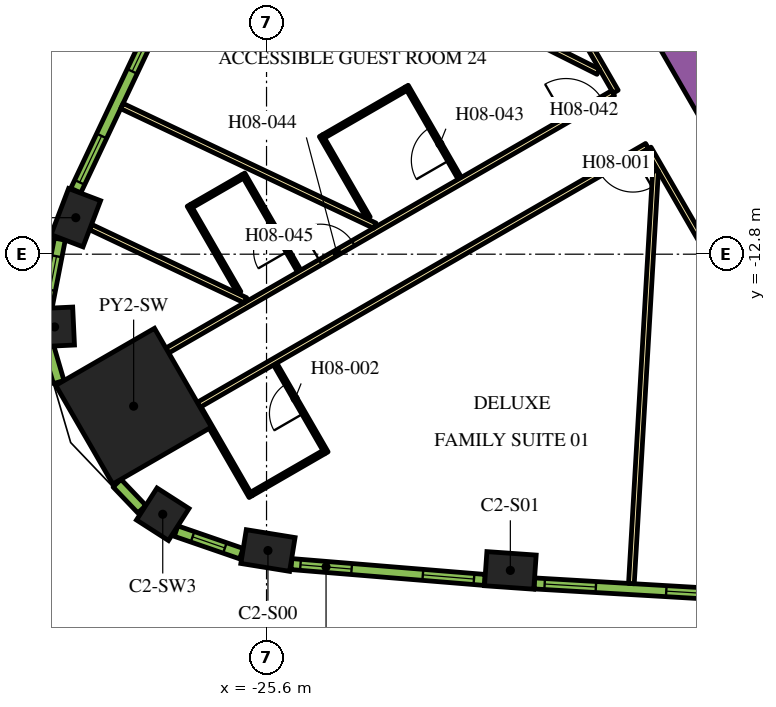
"""IFC4 building model, lengths in metres.
Left out: names, types, materials, properties, quantities, classifications, styles, units other than length and angle.
Written with IfcOpenShell. Run it as: python <this file> out.ifc"""

import sys

from ifc_helpers import new_model, si_unit, direction, frame, frame_2d, origin, origin_2d, place, context, subcontext, project, spatial, rectangle, extrude, element, fill, save


model = new_model("IFC4")
c1 = context("Model", 3, precision=1e-05, world=origin(), true_north=direction((0.0, 1.0)))
c2 = subcontext(c1, "Body", "Model", "MODEL_VIEW")
j1 = project(units=[si_unit("LENGTHUNIT", "METRE"), si_unit("PLANEANGLEUNIT", "RADIAN")], contexts=[c1])
p1 = place(None, origin())
s1 = spatial("IfcSite", under=j1, at=p1, CompositionType="ELEMENT")
p2 = place(p1, origin())
s2 = spatial("IfcBuilding", under=s1, at=p2, CompositionType="ELEMENT")
p3 = place(p2, frame((0.0, 0.0, 114.9)))
s3 = spatial("IfcBuildingStorey", under=s2, at=p3, CompositionType="ELEMENT", Elevation=114.9)
p4 = place(p3, frame((-29.097, -16.799, 0.0), z_axis=(0.0, 0.0, 1.0), x_axis=(-0.866025403784, -0.5, 0.0)))
e1 = element("IfcColumn", 1, at=p4, inside=s3, PredefinedType="COLUMN", context=c2, shape_type="SweptSolid", body=[
    extrude(rectangle(XDim=3.0, YDim=3.0, at=origin_2d()), origin(), (0.0, 0.0, 1.0), 3.9),
])
for number, where, z_axis, x_axis in (
    (2, (-25.563, -20.597, 0.0), (0.0, 0.0, 1.0), (0.987, -0.159, 0.0)),
    (3, (-19.184, -21.12, 0.0), (0.0, 0.0, 1.0), (0.998, -0.07, 0.0)),
    (4, (-30.619, -11.839, 0.0), (0.0, 0.0, 1.0), (-0.355, -0.935, 0.0)),
):
    element("IfcColumn", number, at=place(p3, frame(where, z_axis=z_axis, x_axis=x_axis)), inside=s3, PredefinedType="COLUMN", context=c2, shape_type="SweptSolid", body=[
        extrude(rectangle(XDim=1.3, YDim=0.9, at=origin_2d()), origin(), (0.0, 0.0, 1.0), 3.9),
    ])
for number, where, z_axis, x_axis in (
    (5, (-31.177, -14.714, 0.0), (0.0, 0.0, 1.0), (0.047, -0.999, 0.0)),
    (6, (-28.331, -19.643, 0.0), (0.0, 0.0, 1.0), (0.842, -0.54, 0.0)),
):
    element("IfcColumn", number, at=place(p3, frame(where, z_axis=z_axis, x_axis=x_axis)), inside=s3, PredefinedType="COLUMN", context=c2, shape_type="SweptSolid", body=[
        extrude(rectangle(XDim=1.0, YDim=1.0, at=origin_2d()), origin(), (0.0, 0.0, 1.0), 3.9),
    ])
p5 = place(p3, frame((-12.134, -11.883, 0.0), z_axis=(0.0, 0.0, 1.0), x_axis=(-0.500005339912, 0.866022320763, 0.0)))
e7 = element("IfcWall", 7, at=p5, inside=s3, PredefinedType="SOLIDWALL", context=c2, shape_type="SweptSolid", body=[
    extrude(rectangle(XDim=9.488, YDim=0.9, at=frame_2d((4.744, 0.0))), origin(), (0.0, 0.0, 1.0), 3.9),
])
p6 = place(p3, frame((-12.885, -9.431, 0.0), z_axis=(0.0, 0.0, 1.0), x_axis=(-0.500020560727, 0.866013532718, 0.0)))
e8 = element("IfcWall", 8, at=p6, inside=s3, PredefinedType="SOLIDWALL", context=c2, shape_type="SweptSolid", body=[
    extrude(rectangle(XDim=3.45, YDim=0.25, at=frame_2d((1.725, 0.0))), origin(), (0.0, 0.0, 1.0), 3.9),
])
p7 = place(p3, frame((-16.412, -8.523, 0.0), z_axis=(0.0, 0.0, 1.0), x_axis=(-0.500001929737, 0.866024289647, 0.0)))
e9 = element("IfcWall", 9, at=p7, inside=s3, PredefinedType="PARTITIONING", context=c2, shape_type="SweptSolid", body=[
    extrude(rectangle(XDim=5.268, YDim=0.15, at=frame_2d((2.634, 0.0))), origin(), (0.0, 0.0, 1.0), 2.75),
])
p8 = place(p3, frame((-28.211, -15.335, 0.0), z_axis=(0.0, 0.0, 1.0), x_axis=(0.866025884867, 0.49999916674, 0.0)))
e10 = element("IfcWall", 10, at=p8, inside=s3, PredefinedType="PARTITIONING", context=c2, shape_type="SweptSolid", body=[
    extrude(rectangle(XDim=13.543, YDim=0.15, at=frame_2d((6.772, 0.0))), origin(), (0.0, 0.0, 1.0), 2.75),
])
p9 = place(p8, frame((12.114, 0.0, 0.0)))
e11 = element("IfcOpeningElement", 11, at=p9, cuts=e10, PredefinedType="OPENING", context=c2, shape_type="SweptSolid", body=[
    extrude(rectangle(XDim=1.1, YDim=2.1, at=frame_2d((0.55, 1.05))), frame((0.0, 0.085, 0.0), z_axis=(0.0, -1.0, 0.0), x_axis=(1.0, 0.0, 0.0)), (0.0, 0.0, 1.0), 0.17),
])
p10 = place(p8, frame((4.65, 0.0, 0.0)))
e12 = element("IfcOpeningElement", 12, at=p10, cuts=e10, PredefinedType="OPENING", context=c2, shape_type="SweptSolid", body=[
    extrude(rectangle(XDim=1.0, YDim=2.1, at=frame_2d((0.5, 1.05))), frame((0.0, 0.085, 0.0), z_axis=(0.0, -1.0, 0.0), x_axis=(1.0, 0.0, 0.0)), (0.0, 0.0, 1.0), 0.17),
])
p11 = place(p3, frame((-15.587, -9.952, 0.0), z_axis=(0.0, 0.0, 1.0), x_axis=(-0.866017869832, -0.500013048961, 0.0)))
e13 = element("IfcWall", 13, at=p11, inside=s3, PredefinedType="PARTITIONING", context=c2, shape_type="SweptSolid", body=[
    extrude(rectangle(XDim=13.624, YDim=0.15, at=frame_2d((6.812, 0.0))), origin(), (0.0, 0.0, 1.0), 2.75),
])
p12 = place(p11, frame((0.427, 0.0, 0.0)))
e14 = element("IfcOpeningElement", 14, at=p12, cuts=e13, PredefinedType="OPENING", context=c2, shape_type="SweptSolid", body=[
    extrude(rectangle(XDim=1.0, YDim=2.1, at=frame_2d((0.5, 1.05))), frame((0.0, 0.085, 0.0), z_axis=(0.0, -1.0, 0.0), x_axis=(1.0, 0.0, 0.0)), (0.0, 0.0, 1.0), 0.17),
])
p13 = place(p3, frame((-12.918, -14.575, 0.0), z_axis=(0.0, 0.0, 1.0), x_axis=(-0.500009150678, 0.866020120573, 0.0)))
e15 = element("IfcWall", 15, at=p13, inside=s3, PredefinedType="PARTITIONING", context=c2, shape_type="SweptSolid", body=[
    extrude(rectangle(XDim=5.258, YDim=0.15, at=frame_2d((2.629, 0.0))), origin(), (0.0, 0.0, 1.0), 2.75),
])
p14 = place(p3, frame((-30.231, -12.085, 0.0), z_axis=(0.0, 0.0, 1.0), x_axis=(0.904001132572, -0.427530060122, 0.0)))
e16 = element("IfcWall", 16, at=p14, inside=s3, PredefinedType="PARTITIONING", context=c2, shape_type="SweptSolid", body=[
    extrude(rectangle(XDim=4.51, YDim=0.15, at=frame_2d((2.255, 0.0))), origin(), (0.0, 0.0, 1.0), 2.75),
])
p15 = place(p3, frame((-29.406, -8.901, 0.0), z_axis=(0.0, 0.0, 1.0), x_axis=(0.904002363742, -0.427527456836, 0.0)))
e17 = element("IfcWall", 17, at=p15, inside=s3, PredefinedType="PARTITIONING", context=c2, shape_type="SweptSolid", body=[
    extrude(rectangle(XDim=7.362, YDim=0.15, at=frame_2d((3.681, 0.0))), origin(), (0.0, 0.0, 1.0), 2.75),
])
p16 = place(p3, frame((-26.591, -3.122, 0.0), z_axis=(0.0, 0.0, 1.0), x_axis=(0.893766213273, -0.448533115847, 0.0)))
e18 = element("IfcWall", 18, at=p16, inside=s3, PredefinedType="PARTITIONING", context=c2, shape_type="SweptSolid", body=[
    extrude(rectangle(XDim=10.875, YDim=0.15, at=frame_2d((5.438, 0.0))), origin(), (0.0, 0.0, 1.0), 2.75),
])
p17 = place(p3, frame((-15.999, -21.467, 0.0), z_axis=(0.0, 0.0, 1.0), x_axis=(0.058411453297, 0.998292593443, 0.0)))
e19 = element("IfcWall", 19, at=p17, inside=s3, PredefinedType="PARTITIONING", context=c2, shape_type="SweptSolid", body=[
    extrude(rectangle(XDim=10.875, YDim=0.15, at=frame_2d((5.438, 0.0))), origin(), (0.0, 0.0, 1.0), 2.75),
])
p18 = place(p3, frame((-24.024, -18.027, 0.0), z_axis=(0.0, 0.0, 1.0), x_axis=(-0.4999416173, 0.866059108428, 0.0)))
e20 = element("IfcWall", 20, at=p18, inside=s3, PredefinedType="PARTITIONING", context=c2, shape_type="SweptSolid", body=[
    extrude(rectangle(XDim=2.7, YDim=0.1, at=frame_2d((1.35, 0.0))), origin(), (0.0, 0.0, 1.0), 2.75),
])
p19 = place(p18, frame((1.2, 0.0, 0.0)))
e21 = element("IfcOpeningElement", 21, at=p19, cuts=e20, PredefinedType="OPENING", context=c2, shape_type="SweptSolid", body=[
    extrude(rectangle(XDim=0.9, YDim=2.1, at=frame_2d((0.45, 1.05))), frame((0.0, 0.06, 0.0), z_axis=(0.0, -1.0, 0.0), x_axis=(1.0, 0.0, 0.0)), (0.0, 0.0, 1.0), 0.12),
])
p20 = place(p3, frame((-24.092, -18.009, 0.0), z_axis=(0.0, 0.0, 1.0), x_axis=(-0.866083962871, -0.499898558967, 0.0)))
e22 = element("IfcWall", 22, at=p20, inside=s3, PredefinedType="PARTITIONING", context=c2, shape_type="SweptSolid", body=[
    extrude(rectangle(XDim=2.2, YDim=0.1, at=frame_2d((1.1, 0.0))), origin(), (0.0, 0.0, 1.0), 2.75),
])
p21 = place(p3, frame((-27.365, -16.839, 0.0), z_axis=(0.0, 0.0, 1.0), x_axis=(0.50000943426, -0.866019956843, 0.0)))
e23 = element("IfcWall", 23, at=p21, inside=s3, PredefinedType="PARTITIONING", context=c2, shape_type="SweptSolid", body=[
    extrude(rectangle(XDim=2.7, YDim=0.1, at=frame_2d((1.35, 0.0))), origin(), (0.0, 0.0, 1.0), 2.75),
])
p22 = place(p3, frame((-20.515, -10.805, 0.0), z_axis=(0.0, 0.0, 1.0), x_axis=(-0.49994636267, 0.866056369097, 0.0)))
e24 = element("IfcWall", 24, at=p22, inside=s3, PredefinedType="PARTITIONING", context=c2, shape_type="SweptSolid", body=[
    extrude(rectangle(XDim=2.8, YDim=0.1, at=frame_2d((1.4, 0.0))), origin(), (0.0, 0.0, 1.0), 2.75),
])
p23 = place(p22, frame((0.55, 0.0, 0.0)))
e25 = element("IfcOpeningElement", 25, at=p23, cuts=e24, PredefinedType="OPENING", context=c2, shape_type="SweptSolid", body=[
    extrude(rectangle(XDim=1.0, YDim=2.1, at=frame_2d((0.5, 1.05))), frame((0.0, 0.06, 0.0), z_axis=(0.0, -1.0, 0.0), x_axis=(1.0, 0.0, 0.0)), (0.0, 0.0, 1.0), 0.12),
])
for number, where, z_axis, x_axis in (
    (26, (-21.933, -8.448, 0.0), (0.0, 0.0, 1.0), (-0.866, -0.5, 0.0)),
    (27, (-22.916, -11.845, 0.0), (0.0, 0.0, 1.0), (-0.5, 0.866, 0.0)),
):
    element("IfcWall", number, at=place(p3, frame(where, z_axis=z_axis, x_axis=x_axis)), inside=s3, PredefinedType="PARTITIONING", context=c2, shape_type="SweptSolid", body=[
        extrude(rectangle(XDim=2.5, YDim=0.1, at=frame_2d((1.25, 0.0))), origin(), (0.0, 0.0, 1.0), 2.75),
    ])
p24 = place(p3, frame((-24.74, -13.244, 0.0), z_axis=(0.0, 0.0, 1.0), x_axis=(-0.500037662692, 0.866003658127, 0.0)))
e28 = element("IfcWall", 28, at=p24, inside=s3, PredefinedType="PARTITIONING", context=c2, shape_type="SweptSolid", body=[
    extrude(rectangle(XDim=2.95, YDim=0.1, at=frame_2d((1.475, 0.0))), origin(), (0.0, 0.0, 1.0), 2.75),
])
p25 = place(p24, frame((0.6, 0.0, 0.0)))
e29 = element("IfcOpeningElement", 29, at=p25, cuts=e28, PredefinedType="OPENING", context=c2, shape_type="SweptSolid", body=[
    extrude(rectangle(XDim=0.9, YDim=2.1, at=frame_2d((0.45, 1.05))), frame((0.0, 0.06, 0.0), z_axis=(0.0, -1.0, 0.0), x_axis=(1.0, 0.0, 0.0)), (0.0, 0.0, 1.0), 0.12),
])
p26 = place(p3, frame((-26.233, -10.758, 0.0), z_axis=(0.0, 0.0, 1.0), x_axis=(-0.866043940782, -0.499967891604, 0.0)))
e30 = element("IfcWall", 30, at=p26, inside=s3, PredefinedType="PARTITIONING", context=c2, shape_type="SweptSolid", body=[
    extrude(rectangle(XDim=1.55, YDim=0.1, at=frame_2d((0.775, 0.0))), origin(), (0.0, 0.0, 1.0), 2.75),
])
p27 = place(p3, frame((-26.319, -13.81, 0.0), z_axis=(0.0, 0.0, 1.0), x_axis=(-0.499953715521, 0.866052124492, 0.0)))
e31 = element("IfcWall", 31, at=p27, inside=s3, PredefinedType="PARTITIONING", context=c2, shape_type="SweptSolid", body=[
    extrude(rectangle(XDim=2.65, YDim=0.1, at=frame_2d((1.325, 0.0))), origin(), (0.0, 0.0, 1.0), 2.75),
])
p28 = place(p3, frame((-24.946, -20.954, 0.0), z_axis=(0.0, 0.0, 1.0), x_axis=(0.99665273362, -0.081751627308, 0.0)))
e32 = element("IfcWall", 32, at=p28, inside=s3, PredefinedType="SOLIDWALL", context=c2, shape_type="SweptSolid", body=[
    extrude(rectangle(XDim=5.107, YDim=0.29, at=frame_2d((2.553, 0.0))), origin(), (0.0, 0.0, 1.0), 3.65),
])
p29 = place(p28, frame((0.24, 0.0, 0.9)))
e33 = element("IfcOpeningElement", 33, at=p29, cuts=e32, PredefinedType="OPENING", context=c2, shape_type="SweptSolid", body=[
    extrude(rectangle(XDim=1.35, YDim=2.15, at=frame_2d((0.675, 1.075))), frame((0.0, 0.155, 0.0), z_axis=(0.0, -1.0, 0.0), x_axis=(1.0, 0.0, 0.0)), (0.0, 0.0, 1.0), 0.31),
])
p30 = place(p28, frame((3.471, 0.0, 0.9)))
e34 = element("IfcOpeningElement", 34, at=p30, cuts=e32, PredefinedType="OPENING", context=c2, shape_type="SweptSolid", body=[
    extrude(rectangle(XDim=1.35, YDim=2.15, at=frame_2d((0.675, 1.075))), frame((0.0, 0.155, 0.0), z_axis=(0.0, -1.0, 0.0), x_axis=(1.0, 0.0, 0.0)), (0.0, 0.0, 1.0), 0.31),
])
p31 = place(p3, frame((-18.553, -21.463, 0.0), z_axis=(0.0, 0.0, 1.0), x_axis=(0.998290511436, -0.058447025388, 0.0)))
e35 = element("IfcWall", 35, at=p31, inside=s3, PredefinedType="SOLIDWALL", context=c2, shape_type="SweptSolid", body=[
    extrude(rectangle(XDim=5.1, YDim=0.29, at=frame_2d((2.55, 0.0))), origin(), (0.0, 0.0, 1.0), 3.65),
])
p32 = place(p31, frame((0.273, 0.0, 0.9)))
e36 = element("IfcOpeningElement", 36, at=p32, cuts=e35, PredefinedType="OPENING", context=c2, shape_type="SweptSolid", body=[
    extrude(rectangle(XDim=1.35, YDim=2.15, at=frame_2d((0.675, 1.075))), frame((0.0, 0.155, 0.0), z_axis=(0.0, -1.0, 0.0), x_axis=(1.0, 0.0, 0.0)), (0.0, 0.0, 1.0), 0.31),
])
p33 = place(p31, frame((3.478, 0.0, 0.9)))
e37 = element("IfcOpeningElement", 37, at=p33, cuts=e35, PredefinedType="OPENING", context=c2, shape_type="SweptSolid", body=[
    extrude(rectangle(XDim=1.35, YDim=2.15, at=frame_2d((0.675, 1.075))), frame((0.0, 0.155, 0.0), z_axis=(0.0, -1.0, 0.0), x_axis=(1.0, 0.0, 0.0)), (0.0, 0.0, 1.0), 0.31),
])
p34 = place(p3, frame((-28.436, -6.511, 0.0), z_axis=(0.0, 0.0, 1.0), x_axis=(-0.427543726596, -0.903994669148, 0.0)))
e38 = element("IfcWall", 38, at=p34, inside=s3, PredefinedType="SOLIDWALL", context=c2, shape_type="SweptSolid", body=[
    extrude(rectangle(XDim=5.107, YDim=0.29, at=frame_2d((2.553, 0.0))), origin(), (0.0, 0.0, 1.0), 3.65),
])
p35 = place(p34, frame((0.285, 0.0, 0.9)))
e39 = element("IfcOpeningElement", 39, at=p35, cuts=e38, PredefinedType="OPENING", context=c2, shape_type="SweptSolid", body=[
    extrude(rectangle(XDim=1.35, YDim=2.15, at=frame_2d((0.675, 1.075))), frame((0.0, 0.155, 0.0), z_axis=(0.0, -1.0, 0.0), x_axis=(1.0, 0.0, 0.0)), (0.0, 0.0, 1.0), 0.31),
])
p36 = place(p34, frame((3.516, 0.0, 0.9)))
e40 = element("IfcOpeningElement", 40, at=p36, cuts=e38, PredefinedType="OPENING", context=c2, shape_type="SweptSolid", body=[
    extrude(rectangle(XDim=1.35, YDim=2.15, at=frame_2d((0.675, 1.075))), frame((0.0, 0.155, 0.0), z_axis=(0.0, -1.0, 0.0), x_axis=(1.0, 0.0, 0.0)), (0.0, 0.0, 1.0), 0.31),
])
p37 = place(p3, frame((-31.039, -12.403, 0.0), z_axis=(0.0, 0.0, 1.0), x_axis=(-0.190409913989, -0.981704672829, 0.0)))
e41 = element("IfcWall", 41, at=p37, inside=s3, PredefinedType="SOLIDWALL", context=c2, shape_type="SweptSolid", body=[
    extrude(rectangle(XDim=1.819, YDim=0.29, at=frame_2d((0.91, 0.0))), origin(), (0.0, 0.0, 1.0), 3.65),
])
p38 = place(p37, frame((0.46, 0.0, 0.9)))
e42 = element("IfcOpeningElement", 42, at=p38, cuts=e41, PredefinedType="OPENING", context=c2, shape_type="SweptSolid", body=[
    extrude(rectangle(XDim=0.9, YDim=2.15, at=frame_2d((0.45, 1.075))), frame((0.0, 0.155, 0.0), z_axis=(0.0, -1.0, 0.0), x_axis=(1.0, 0.0, 0.0)), (0.0, 0.0, 1.0), 0.31),
])
p39 = place(p3, frame((-31.336, -15.256, 0.0), z_axis=(0.0, 0.0, 1.0), x_axis=(0.281454582132, -0.95957455062, 0.0)))
e43 = element("IfcWall", 43, at=p39, inside=s3, PredefinedType="SOLIDWALL", context=c2, shape_type="SweptSolid", body=[
    extrude(rectangle(XDim=0.947, YDim=0.29, at=frame_2d((0.474, 0.0))), origin(), (0.0, 0.0, 1.0), 3.65),
])
p40 = place(p3, frame((-29.534, -18.824, 0.0), z_axis=(0.0, 0.0, 1.0), x_axis=(0.690414427296, -0.723414071319, 0.0)))
e44 = element("IfcWall", 44, at=p40, inside=s3, PredefinedType="SOLIDWALL", context=c2, shape_type="SweptSolid", body=[
    extrude(rectangle(XDim=0.947, YDim=0.29, at=frame_2d((0.474, 0.0))), origin(), (0.0, 0.0, 1.0), 3.65),
])
p41 = place(p3, frame((-27.981, -20.086, 0.0), z_axis=(0.0, 0.0, 1.0), x_axis=(0.945385815453, -0.325953462844, 0.0)))
e45 = element("IfcWall", 45, at=p41, inside=s3, PredefinedType="SOLIDWALL", context=c2, shape_type="SweptSolid", body=[
    extrude(rectangle(XDim=1.819, YDim=0.29, at=frame_2d((0.91, 0.0))), origin(), (0.0, 0.0, 1.0), 3.65),
])
p42 = place(p41, frame((0.46, 0.0, 0.9)))
e46 = element("IfcOpeningElement", 46, at=p42, cuts=e45, PredefinedType="OPENING", context=c2, shape_type="SweptSolid", body=[
    extrude(rectangle(XDim=0.9, YDim=2.15, at=frame_2d((0.45, 1.075))), frame((0.0, 0.155, 0.0), z_axis=(0.0, -1.0, 0.0), x_axis=(1.0, 0.0, 0.0)), (0.0, 0.0, 1.0), 0.31),
])
p43 = place(p12, origin())
e47 = element("IfcDoor", 47, at=p43, inside=s3, OperationType="SINGLE_SWING_LEFT", PredefinedType="DOOR", context=c2, shape_type="SweptSolid", body=[
    extrude(rectangle(XDim=1.0, YDim=2.1, at=frame_2d((0.5, 1.05))), frame((0.0, 0.025, 0.0), z_axis=(0.0, -1.0, 0.0), x_axis=(1.0, 0.0, 0.0)), (0.0, 0.0, 1.0), 0.05),
])
fill(e14, e47)
p44 = place(p19, origin())
e48 = element("IfcDoor", 48, at=p44, inside=s3, OperationType="SINGLE_SWING_LEFT", PredefinedType="DOOR", context=c2, shape_type="SweptSolid", body=[
    extrude(rectangle(XDim=0.9, YDim=2.1, at=frame_2d((0.45, 1.05))), frame((0.0, 0.025, 0.0), z_axis=(0.0, -1.0, 0.0), x_axis=(1.0, 0.0, 0.0)), (0.0, 0.0, 1.0), 0.05),
])
fill(e21, e48)
p45 = place(p9, origin())
e49 = element("IfcDoor", 49, at=p45, inside=s3, OperationType="SINGLE_SWING_RIGHT", PredefinedType="DOOR", context=c2, shape_type="SweptSolid", body=[
    extrude(rectangle(XDim=1.1, YDim=2.1, at=frame_2d((0.55, 1.05))), frame((0.0, 0.025, 0.0), z_axis=(0.0, -1.0, 0.0), x_axis=(1.0, 0.0, 0.0)), (0.0, 0.0, 1.0), 0.05),
])
fill(e11, e49)
p46 = place(p23, origin())
e50 = element("IfcDoor", 50, at=p46, inside=s3, OperationType="SINGLE_SWING_RIGHT", PredefinedType="DOOR", context=c2, shape_type="SweptSolid", body=[
    extrude(rectangle(XDim=1.0, YDim=2.1, at=frame_2d((0.5, 1.05))), frame((0.0, 0.025, 0.0), z_axis=(0.0, -1.0, 0.0), x_axis=(1.0, 0.0, 0.0)), (0.0, 0.0, 1.0), 0.05),
])
fill(e25, e50)
p47 = place(p10, origin())
e51 = element("IfcDoor", 51, at=p47, inside=s3, OperationType="SINGLE_SWING_RIGHT", PredefinedType="DOOR", context=c2, shape_type="SweptSolid", body=[
    extrude(rectangle(XDim=1.0, YDim=2.1, at=frame_2d((0.5, 1.05))), frame((0.0, 0.025, 0.0), z_axis=(0.0, -1.0, 0.0), x_axis=(1.0, 0.0, 0.0)), (0.0, 0.0, 1.0), 0.05),
])
fill(e12, e51)
p48 = place(p25, origin())
e52 = element("IfcDoor", 52, at=p48, inside=s3, OperationType="SINGLE_SWING_LEFT", PredefinedType="DOOR", context=c2, shape_type="SweptSolid", body=[
    extrude(rectangle(XDim=0.9, YDim=2.1, at=frame_2d((0.45, 1.05))), frame((0.0, 0.025, 0.0), z_axis=(0.0, -1.0, 0.0), x_axis=(1.0, 0.0, 0.0)), (0.0, 0.0, 1.0), 0.05),
])
fill(e29, e52)
p49 = place(p29, origin())
e53 = element("IfcWindow", 53, at=p49, inside=s3, PartitioningType="DOUBLE_PANEL_VERTICAL", PredefinedType="WINDOW", context=c2, shape_type="SweptSolid", body=[
    extrude(rectangle(XDim=1.35, YDim=2.15, at=frame_2d((0.675, 1.075))), frame((0.0, 0.015, 0.0), z_axis=(0.0, -1.0, 0.0), x_axis=(1.0, 0.0, 0.0)), (0.0, 0.0, 1.0), 0.06),
])
fill(e33, e53)
p50 = place(p30, origin())
e54 = element("IfcWindow", 54, at=p50, inside=s3, PartitioningType="DOUBLE_PANEL_VERTICAL", PredefinedType="WINDOW", context=c2, shape_type="SweptSolid", body=[
    extrude(rectangle(XDim=1.35, YDim=2.15, at=frame_2d((0.675, 1.075))), frame((0.0, 0.015, 0.0), z_axis=(0.0, -1.0, 0.0), x_axis=(1.0, 0.0, 0.0)), (0.0, 0.0, 1.0), 0.06),
])
fill(e34, e54)
p51 = place(p32, origin())
e55 = element("IfcWindow", 55, at=p51, inside=s3, PartitioningType="DOUBLE_PANEL_VERTICAL", PredefinedType="WINDOW", context=c2, shape_type="SweptSolid", body=[
    extrude(rectangle(XDim=1.35, YDim=2.15, at=frame_2d((0.675, 1.075))), frame((0.0, 0.015, 0.0), z_axis=(0.0, -1.0, 0.0), x_axis=(1.0, 0.0, 0.0)), (0.0, 0.0, 1.0), 0.06),
])
fill(e36, e55)
p52 = place(p33, origin())
e56 = element("IfcWindow", 56, at=p52, inside=s3, PartitioningType="DOUBLE_PANEL_VERTICAL", PredefinedType="WINDOW", context=c2, shape_type="SweptSolid", body=[
    extrude(rectangle(XDim=1.35, YDim=2.15, at=frame_2d((0.675, 1.075))), frame((0.0, 0.015, 0.0), z_axis=(0.0, -1.0, 0.0), x_axis=(1.0, 0.0, 0.0)), (0.0, 0.0, 1.0), 0.06),
])
fill(e37, e56)
p53 = place(p35, origin())
e57 = element("IfcWindow", 57, at=p53, inside=s3, PartitioningType="DOUBLE_PANEL_VERTICAL", PredefinedType="WINDOW", context=c2, shape_type="SweptSolid", body=[
    extrude(rectangle(XDim=1.35, YDim=2.15, at=frame_2d((0.675, 1.075))), frame((0.0, 0.015, 0.0), z_axis=(0.0, -1.0, 0.0), x_axis=(1.0, 0.0, 0.0)), (0.0, 0.0, 1.0), 0.06),
])
fill(e39, e57)
p54 = place(p36, origin())
e58 = element("IfcWindow", 58, at=p54, inside=s3, PartitioningType="DOUBLE_PANEL_VERTICAL", PredefinedType="WINDOW", context=c2, shape_type="SweptSolid", body=[
    extrude(rectangle(XDim=1.35, YDim=2.15, at=frame_2d((0.675, 1.075))), frame((0.0, 0.015, 0.0), z_axis=(0.0, -1.0, 0.0), x_axis=(1.0, 0.0, 0.0)), (0.0, 0.0, 1.0), 0.06),
])
fill(e40, e58)
p55 = place(p38, origin())
e59 = element("IfcWindow", 59, at=p55, inside=s3, PartitioningType="SINGLE_PANEL", PredefinedType="WINDOW", context=c2, shape_type="SweptSolid", body=[
    extrude(rectangle(XDim=0.9, YDim=2.15, at=frame_2d((0.45, 1.075))), frame((0.0, 0.015, 0.0), z_axis=(0.0, -1.0, 0.0), x_axis=(1.0, 0.0, 0.0)), (0.0, 0.0, 1.0), 0.06),
])
fill(e42, e59)
p56 = place(p42, origin())
e60 = element("IfcWindow", 60, at=p56, inside=s3, PartitioningType="SINGLE_PANEL", PredefinedType="WINDOW", context=c2, shape_type="SweptSolid", body=[
    extrude(rectangle(XDim=0.9, YDim=2.15, at=frame_2d((0.45, 1.075))), frame((0.0, 0.015, 0.0), z_axis=(0.0, -1.0, 0.0), x_axis=(1.0, 0.0, 0.0)), (0.0, 0.0, 1.0), 0.06),
])
fill(e46, e60)
save(model, sys.argv[1])
